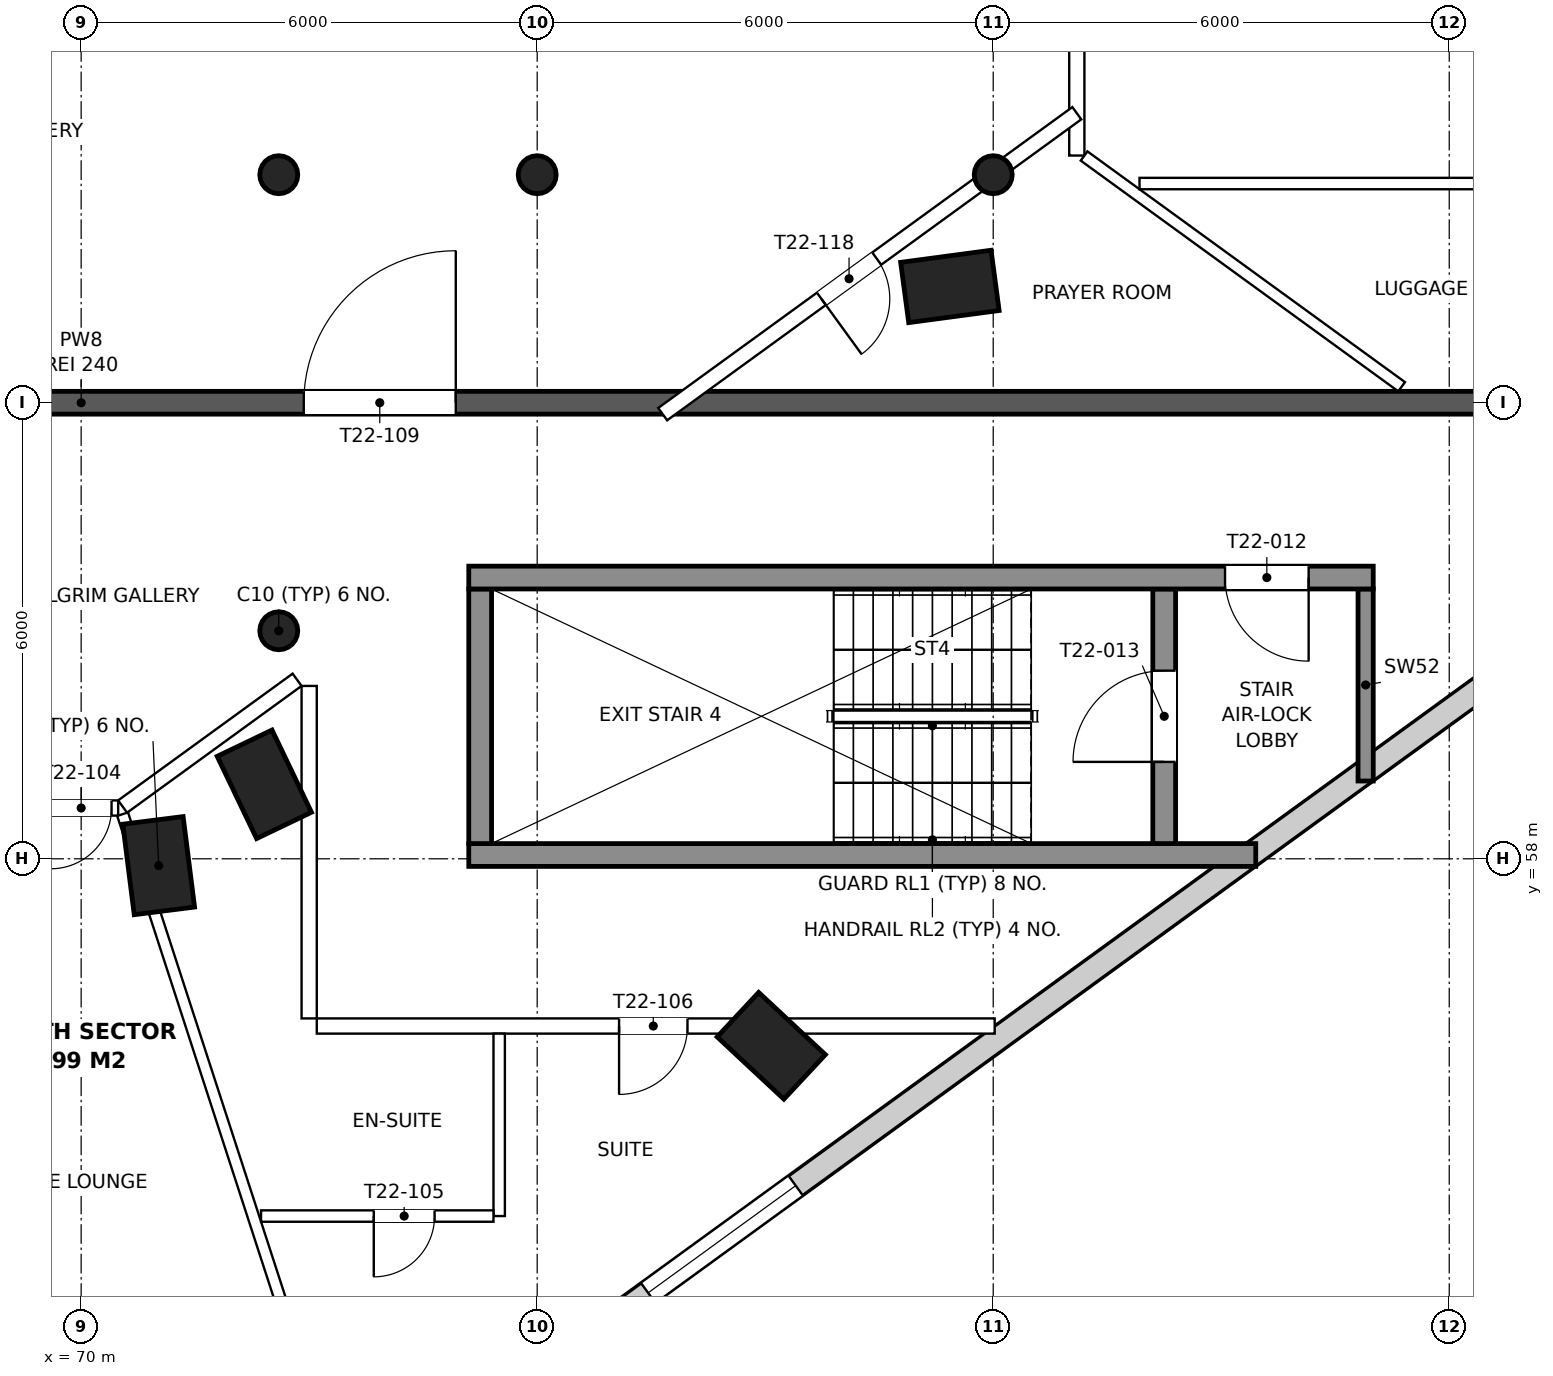
"""IFC4 building model, lengths in metres.
Left out: names, types, materials, properties, quantities, classifications, styles, units other than length and angle.
Written with IfcOpenShell. Run it as: python <this file> out.ifc"""

import sys

from ifc_helpers import new_model, si_unit, direction, frame, frame_2d, origin, origin_2d, place, context, subcontext, project, spatial, rectangle, circle, extrude, element, fill, save


model = new_model("IFC4")
c1 = context("Model", 3, precision=1e-05, world=origin(), true_north=direction((0.0, 1.0)))
c2 = subcontext(c1, "Body", "Model", "MODEL_VIEW")
j1 = project(units=[si_unit("LENGTHUNIT", "METRE"), si_unit("PLANEANGLEUNIT", "RADIAN")], contexts=[c1])
p1 = place(None, origin())
s1 = spatial("IfcSite", under=j1, at=p1, CompositionType="ELEMENT")
p2 = place(p1, origin())
s2 = spatial("IfcBuilding", under=s1, at=p2, CompositionType="ELEMENT")
p3 = place(p2, frame((0.0, 0.0, 313.9)))
s3 = spatial("IfcBuildingStorey", under=s2, at=p3, CompositionType="ELEMENT", Elevation=313.9)
for number, where, z_axis, x_axis in (
    (1, (79.08, 55.54, 0.0), (0.0, 0.0, 1.0), (-0.682, -0.731, 0.0)),
    (2, (71.02, 57.91, 0.0), (0.0, 0.0, 1.0), (-0.992, -0.126, 0.0)),
    (3, (72.41, 58.98, 0.0), (0.0, 0.0, 1.0), (-0.902, -0.432, 0.0)),
    (4, (81.43, 65.53, 0.0), (0.0, 0.0, 1.0), (0.133, -0.991, 0.0)),
):
    element("IfcColumn", number, at=place(p3, frame(where, z_axis=z_axis, x_axis=x_axis)), inside=s3, PredefinedType="COLUMN", context=c2, shape_type="SweptSolid", body=[
        extrude(rectangle(XDim=0.8, YDim=1.2, at=origin_2d()), origin(), (0.0, 0.0, 1.0), 3.9),
    ])
for number, where, z_axis, x_axis in (
    (5, (72.6, 61.0, 0.0), (0.0, 0.0, 1.0), (1.0, 0.0, 0.0)),
    (6, (72.6, 67.0, 0.0), (0.0, 0.0, 1.0), (1.0, 0.0, 0.0)),
    (7, (76.0, 67.0, 0.0), (0.0, 0.0, 1.0), (1.0, 0.0, 0.0)),
    (8, (82.0, 67.0, 0.0), (0.0, 0.0, 1.0), (1.0, 0.0, 0.0)),
):
    element("IfcColumn", number, at=place(p3, frame(where, z_axis=z_axis, x_axis=x_axis)), inside=s3, PredefinedType="COLUMN", context=c2, shape_type="SweptSolid", body=[
        extrude(circle(Radius=0.25, at=origin_2d()), origin(), (0.0, 0.0, 1.0), 3.9),
    ])
p4 = place(p3, frame((73.521, 49.428, 0.0), z_axis=(0.0, 0.0, 1.0), x_axis=(0.809014717996, 0.587788385447, 0.0)))
e9 = element("IfcWall", 9, at=p4, inside=s3, PredefinedType="SOLIDWALL", context=c2, shape_type="SweptSolid", body=[
    extrude(rectangle(XDim=21.136, YDim=0.32, at=frame_2d((10.568, 0.0))), origin(), (0.0, 0.0, 1.0), 3.6),
])
p5 = place(p4, frame((1.868, 0.0, 0.55)))
e10 = element("IfcOpeningElement", 10, at=p5, cuts=e9, PredefinedType="OPENING", context=c2, shape_type="SweptSolid", body=[
    extrude(rectangle(XDim=2.4, YDim=2.3, at=frame_2d((1.2, 1.15))), frame((0.0, 0.17, 0.0), z_axis=(0.0, -1.0, 0.0), x_axis=(1.0, 0.0, 0.0)), (0.0, 0.0, 1.0), 0.34),
])
p6 = place(p4, frame((4.868, 0.0, 0.55)))
e11 = element("IfcOpeningElement", 11, at=p6, cuts=e9, PredefinedType="OPENING", context=c2, shape_type="SweptSolid", body=[
    extrude(rectangle(XDim=2.4, YDim=2.3, at=frame_2d((1.2, 1.15))), frame((0.0, 0.17, 0.0), z_axis=(0.0, -1.0, 0.0), x_axis=(1.0, 0.0, 0.0)), (0.0, 0.0, 1.0), 0.34),
])
p7 = place(p3, frame((92.256, 66.884, 0.0), z_axis=(0.0, 0.0, 1.0), x_axis=(-0.309017883781, 0.951056227309, 0.0)))
e12 = element("IfcWall", 12, at=p7, inside=s3, PredefinedType="SOLIDWALL", context=c2, shape_type="SweptSolid", body=[
    extrude(rectangle(XDim=17.973, YDim=0.32, at=frame_2d((8.986, 0.0))), origin(), (0.0, 0.0, 1.0), 3.6),
])
p8 = place(p7, frame((1.886, 0.0, 0.75)))
e13 = element("IfcOpeningElement", 13, at=p8, cuts=e12, PredefinedType="OPENING", context=c2, shape_type="SweptSolid", body=[
    extrude(rectangle(XDim=2.2, YDim=2.1, at=frame_2d((1.1, 1.05))), frame((0.0, 0.17, 0.0), z_axis=(0.0, -1.0, 0.0), x_axis=(1.0, 0.0, 0.0)), (0.0, 0.0, 1.0), 0.34),
])
p9 = place(p7, frame((4.787, 0.0, 0.55)))
e14 = element("IfcOpeningElement", 14, at=p9, cuts=e12, PredefinedType="OPENING", context=c2, shape_type="SweptSolid", body=[
    extrude(rectangle(XDim=2.4, YDim=2.3, at=frame_2d((1.2, 1.15))), frame((0.0, 0.17, 0.0), z_axis=(0.0, -1.0, 0.0), x_axis=(1.0, 0.0, 0.0)), (0.0, 0.0, 1.0), 0.34),
])
p10 = place(p7, frame((7.787, 0.0, 0.55)))
e15 = element("IfcOpeningElement", 15, at=p10, cuts=e12, PredefinedType="OPENING", context=c2, shape_type="SweptSolid", body=[
    extrude(rectangle(XDim=2.4, YDim=2.3, at=frame_2d((1.2, 1.15))), frame((0.0, 0.17, 0.0), z_axis=(0.0, -1.0, 0.0), x_axis=(1.0, 0.0, 0.0)), (0.0, 0.0, 1.0), 0.34),
])
p11 = place(p7, frame((10.787, 0.0, 0.55)))
e16 = element("IfcOpeningElement", 16, at=p11, cuts=e12, PredefinedType="OPENING", context=c2, shape_type="SweptSolid", body=[
    extrude(rectangle(XDim=2.4, YDim=2.3, at=frame_2d((1.2, 1.15))), frame((0.0, 0.17, 0.0), z_axis=(0.0, -1.0, 0.0), x_axis=(1.0, 0.0, 0.0)), (0.0, 0.0, 1.0), 0.34),
])
p12 = place(p7, frame((13.787, 0.0, 0.55)))
e17 = element("IfcOpeningElement", 17, at=p12, cuts=e12, PredefinedType="OPENING", context=c2, shape_type="SweptSolid", body=[
    extrude(rectangle(XDim=2.4, YDim=2.3, at=frame_2d((1.2, 1.15))), frame((0.0, 0.17, 0.0), z_axis=(0.0, -1.0, 0.0), x_axis=(1.0, 0.0, 0.0)), (0.0, 0.0, 1.0), 0.34),
])
p13 = place(p3, frame((75.1, 58.05, 0.0), z_axis=(0.0, 0.0, 1.0), x_axis=(1.0, 0.0, 0.0)))
e18 = element("IfcWall", 18, at=p13, inside=s3, PredefinedType="SHEAR", context=c2, shape_type="SweptSolid", body=[
    extrude(rectangle(XDim=10.354, YDim=0.3, at=frame_2d((5.177, 0.0))), origin(), (0.0, 0.0, 1.0), 3.9),
])
p14 = place(p3, frame((75.25, 58.2, 0.0), z_axis=(0.0, 0.0, 1.0), x_axis=(0.0, 1.0, 0.0)))
e19 = element("IfcWall", 19, at=p14, inside=s3, PredefinedType="SHEAR", context=c2, shape_type="SweptSolid", body=[
    extrude(rectangle(XDim=3.35, YDim=0.3, at=frame_2d((1.675, 0.0))), origin(), (0.0, 0.0, 1.0), 3.9),
])
p15 = place(p3, frame((84.25, 58.2, 0.0), z_axis=(0.0, 0.0, 1.0), x_axis=(0.0, 1.0, 0.0)))
e20 = element("IfcWall", 20, at=p15, inside=s3, PredefinedType="SHEAR", context=c2, shape_type="SweptSolid", body=[
    extrude(rectangle(XDim=3.35, YDim=0.3, at=frame_2d((1.675, 0.0))), origin(), (0.0, 0.0, 1.0), 3.9),
])
p16 = place(p15, frame((1.075, 0.0, 0.0)))
e21 = element("IfcOpeningElement", 21, at=p16, cuts=e20, PredefinedType="OPENING", context=c2, shape_type="SweptSolid", body=[
    extrude(rectangle(XDim=1.2, YDim=2.1, at=frame_2d((0.6, 1.05))), frame((0.0, 0.16, 0.0), z_axis=(0.0, -1.0, 0.0), x_axis=(1.0, 0.0, 0.0)), (0.0, 0.0, 1.0), 0.32),
])
p17 = place(p3, frame((86.9, 59.023, 0.0), z_axis=(0.0, 0.0, 1.0), x_axis=(0.0, 1.0, 0.0)))
e22 = element("IfcWall", 22, at=p17, inside=s3, PredefinedType="SHEAR", context=c2, shape_type="SweptSolid", body=[
    extrude(rectangle(XDim=2.527, YDim=0.2, at=frame_2d((1.263, 0.0))), origin(), (0.0, 0.0, 1.0), 3.9),
])
p18 = place(p3, frame((75.1, 61.7, 0.0), z_axis=(0.0, 0.0, 1.0), x_axis=(1.0, 0.0, 0.0)))
e23 = element("IfcWall", 23, at=p18, inside=s3, PredefinedType="SHEAR", context=c2, shape_type="SweptSolid", body=[
    extrude(rectangle(XDim=11.9, YDim=0.3, at=frame_2d((5.95, 0.0))), origin(), (0.0, 0.0, 1.0), 3.9),
])
p19 = place(p18, frame((9.95, 0.0, 0.0)))
e24 = element("IfcOpeningElement", 24, at=p19, cuts=e23, PredefinedType="OPENING", context=c2, shape_type="SweptSolid", body=[
    extrude(rectangle(XDim=1.1, YDim=2.1, at=frame_2d((0.55, 1.05))), frame((0.0, 0.16, 0.0), z_axis=(0.0, -1.0, 0.0), x_axis=(1.0, 0.0, 0.0)), (0.0, 0.0, 1.0), 0.32),
])
p20 = place(p3, frame((48.85, 64.0, 0.0), z_axis=(0.0, 0.0, 1.0), x_axis=(1.0, 0.0, 0.0)))
e25 = element("IfcWall", 25, at=p20, inside=s3, PredefinedType="PARTITIONING", context=c2, shape_type="SweptSolid", body=[
    extrude(rectangle(XDim=42.301, YDim=0.3, at=frame_2d((21.15, 0.0))), origin(), (0.0, 0.0, 1.0), 3.1),
])
p21 = place(p20, frame((16.222, 0.0, 0.0)))
e26 = element("IfcOpeningElement", 26, at=p21, cuts=e25, PredefinedType="OPENING", context=c2, shape_type="SweptSolid", body=[
    extrude(rectangle(XDim=2.0, YDim=2.1, at=frame_2d((1.0, 1.05))), frame((0.0, 0.16, 0.0), z_axis=(0.0, -1.0, 0.0), x_axis=(1.0, 0.0, 0.0)), (0.0, 0.0, 1.0), 0.32),
])
p22 = place(p20, frame((24.079, 0.0, 0.0)))
e27 = element("IfcOpeningElement", 27, at=p22, cuts=e25, PredefinedType="OPENING", context=c2, shape_type="SweptSolid", body=[
    extrude(rectangle(XDim=2.0, YDim=2.1, at=frame_2d((1.0, 1.05))), frame((0.0, 0.16, 0.0), z_axis=(0.0, -1.0, 0.0), x_axis=(1.0, 0.0, 0.0)), (0.0, 0.0, 1.0), 0.32),
])
p23 = place(p3, frame((83.1, 86.396, 0.0), z_axis=(0.0, 0.0, 1.0), x_axis=(0.0, -1.0, 0.0)))
e28 = element("IfcWall", 28, at=p23, inside=s3, PredefinedType="PARTITIONING", context=c2, shape_type="SweptSolid", body=[
    extrude(rectangle(XDim=19.144, YDim=0.2, at=frame_2d((9.572, 0.0))), origin(), (0.0, 0.0, 1.0), 3.15),
])
p24 = place(p23, frame((2.422, 0.0, 0.0)))
e29 = element("IfcOpeningElement", 29, at=p24, cuts=e28, PredefinedType="OPENING", context=c2, shape_type="SweptSolid", body=[
    extrude(rectangle(XDim=0.9, YDim=2.1, at=frame_2d((0.45, 1.05))), frame((0.0, 0.11, 0.0), z_axis=(0.0, -1.0, 0.0), x_axis=(1.0, 0.0, 0.0)), (0.0, 0.0, 1.0), 0.22),
])
p25 = place(p23, frame((5.873, 0.0, 0.0)))
e30 = element("IfcOpeningElement", 30, at=p25, cuts=e28, PredefinedType="OPENING", context=c2, shape_type="SweptSolid", body=[
    extrude(rectangle(XDim=0.9, YDim=2.1, at=frame_2d((0.45, 1.05))), frame((0.0, 0.11, 0.0), z_axis=(0.0, -1.0, 0.0), x_axis=(1.0, 0.0, 0.0)), (0.0, 0.0, 1.0), 0.22),
])
p26 = place(p23, frame((12.539, 0.0, 0.0)))
e31 = element("IfcOpeningElement", 31, at=p26, cuts=e28, PredefinedType="OPENING", context=c2, shape_type="SweptSolid", body=[
    extrude(rectangle(XDim=0.9, YDim=2.1, at=frame_2d((0.45, 1.05))), frame((0.0, 0.11, 0.0), z_axis=(0.0, -1.0, 0.0), x_axis=(1.0, 0.0, 0.0)), (0.0, 0.0, 1.0), 0.22),
])
p27 = place(p23, frame((15.628, 0.0, 0.0)))
e32 = element("IfcOpeningElement", 32, at=p27, cuts=e28, PredefinedType="OPENING", context=c2, shape_type="SweptSolid", body=[
    extrude(rectangle(XDim=0.9, YDim=2.1, at=frame_2d((0.45, 1.05))), frame((0.0, 0.11, 0.0), z_axis=(0.0, -1.0, 0.0), x_axis=(1.0, 0.0, 0.0)), (0.0, 0.0, 1.0), 0.22),
])
p28 = place(p3, frame((83.1, 67.809, 0.0), z_axis=(0.0, 0.0, 1.0), x_axis=(-0.809033820778, -0.587762092038, 0.0)))
e33 = element("IfcWall", 33, at=p28, inside=s3, PredefinedType="PARTITIONING", context=c2, shape_type="SweptSolid", body=[
    extrude(rectangle(XDim=6.735, YDim=0.2, at=frame_2d((3.367, 0.0))), origin(), (0.0, 0.0, 1.0), 3.6),
])
p29 = place(p28, frame((3.254, 0.0, 0.0)))
e34 = element("IfcOpeningElement", 34, at=p29, cuts=e33, PredefinedType="OPENING", context=c2, shape_type="SweptSolid", body=[
    extrude(rectangle(XDim=0.9, YDim=2.1, at=frame_2d((0.45, 1.05))), frame((0.0, 0.11, 0.0), z_axis=(0.0, -1.0, 0.0), x_axis=(1.0, 0.0, 0.0)), (0.0, 0.0, 1.0), 0.22),
])
p30 = place(p3, frame((82.019, 55.8, 0.0), z_axis=(0.0, 0.0, 1.0), x_axis=(-1.0, 0.0, 0.0)))
e35 = element("IfcWall", 35, at=p30, inside=s3, PredefinedType="PARTITIONING", context=c2, shape_type="SweptSolid", body=[
    extrude(rectangle(XDim=8.919, YDim=0.2, at=frame_2d((4.459, 0.0))), origin(), (0.0, 0.0, 1.0), 3.6),
])
p31 = place(p30, frame((4.042, 0.0, 0.0)))
e36 = element("IfcOpeningElement", 36, at=p31, cuts=e35, PredefinedType="OPENING", context=c2, shape_type="SweptSolid", body=[
    extrude(rectangle(XDim=0.9, YDim=2.1, at=frame_2d((0.45, 1.05))), frame((0.0, 0.11, 0.0), z_axis=(0.0, -1.0, 0.0), x_axis=(1.0, 0.0, 0.0)), (0.0, 0.0, 1.0), 0.22),
])
p32 = place(p3, frame((73.0, 55.9, 0.0), z_axis=(0.0, 0.0, 1.0), x_axis=(0.0, 1.0, 0.0)))
e37 = element("IfcWall", 37, at=p32, inside=s3, PredefinedType="PARTITIONING", context=c2, shape_type="SweptSolid", body=[
    extrude(rectangle(XDim=4.375, YDim=0.2, at=frame_2d((2.187, 0.0))), origin(), (0.0, 0.0, 1.0), 3.1),
])
p33 = place(p3, frame((72.841, 60.355, 0.0), z_axis=(0.0, 0.0, 1.0), x_axis=(-0.80904479074, -0.587746991976, 0.0)))
e38 = element("IfcWall", 38, at=p33, inside=s3, PredefinedType="PARTITIONING", context=c2, shape_type="SweptSolid", body=[
    extrude(rectangle(XDim=2.837, YDim=0.2, at=frame_2d((1.419, 0.0))), origin(), (0.0, 0.0, 1.0), 3.6),
])
p34 = place(p3, frame((70.487, 58.668, 0.0), z_axis=(0.0, 0.0, 1.0), x_axis=(-1.0, 0.0, 0.0)))
e39 = element("IfcWall", 39, at=p34, inside=s3, PredefinedType="PARTITIONING", context=c2, shape_type="SweptSolid", body=[
    extrude(rectangle(XDim=0.974, YDim=0.2, at=frame_2d((0.487, 0.0))), origin(), (0.0, 0.0, 1.0), 3.6),
])
p35 = place(p34, frame((0.087, 0.0, 0.0)))
e40 = element("IfcOpeningElement", 40, at=p35, cuts=e39, PredefinedType="OPENING", context=c2, shape_type="SweptSolid", body=[
    extrude(rectangle(XDim=0.8, YDim=2.1, at=frame_2d((0.4, 1.05))), frame((0.0, 0.11, 0.0), z_axis=(0.0, -1.0, 0.0), x_axis=(1.0, 0.0, 0.0)), (0.0, 0.0, 1.0), 0.22),
])
p36 = place(p3, frame((73.469, 49.588, 0.0), z_axis=(0.0, 0.0, 1.0), x_axis=(-0.3090043917, 0.95106061106, 0.0)))
e41 = element("IfcWall", 41, at=p36, inside=s3, PredefinedType="PARTITIONING", context=c2, shape_type="SweptSolid", body=[
    extrude(rectangle(XDim=9.462, YDim=0.15, at=frame_2d((4.731, 0.0))), origin(), (0.0, 0.0, 1.0), 3.15),
])
p37 = place(p3, frame((87.374, 64.211, 0.0), z_axis=(0.0, 0.0, 1.0), x_axis=(-0.809024239464, 0.587775280153, 0.0)))
e42 = element("IfcWall", 42, at=p37, inside=s3, PredefinedType="PARTITIONING", context=c2, shape_type="SweptSolid", body=[
    extrude(rectangle(XDim=5.164, YDim=0.15, at=frame_2d((2.582, 0.0))), origin(), (0.0, 0.0, 1.0), 3.6),
])
p38 = place(p3, frame((92.087, 66.884, 0.0), z_axis=(0.0, 0.0, 1.0), x_axis=(-1.0, 0.0, 0.0)))
e43 = element("IfcWall", 43, at=p38, inside=s3, PredefinedType="PARTITIONING", context=c2, shape_type="SweptSolid", body=[
    extrude(rectangle(XDim=8.162, YDim=0.15, at=frame_2d((4.081, 0.0))), origin(), (0.0, 0.0, 1.0), 3.15),
])
p39 = place(p38, frame((0.2, 0.0, 0.0)))
e44 = element("IfcOpeningElement", 44, at=p39, cuts=e43, PredefinedType="OPENING", context=c2, shape_type="SweptSolid", body=[
    extrude(rectangle(XDim=0.9, YDim=2.1, at=frame_2d((0.45, 1.05))), frame((0.0, 0.085, 0.0), z_axis=(0.0, -1.0, 0.0), x_axis=(1.0, 0.0, 0.0)), (0.0, 0.0, 1.0), 0.17),
])
p40 = place(p3, frame((75.5, 55.7, 0.0), z_axis=(0.0, 0.0, 1.0), x_axis=(0.0, -1.0, 0.0)))
e45 = element("IfcWall", 45, at=p40, inside=s3, PredefinedType="PARTITIONING", context=c2, shape_type="SweptSolid", body=[
    extrude(rectangle(XDim=2.4, YDim=0.15, at=frame_2d((1.2, 0.0))), origin(), (0.0, 0.0, 1.0), 3.6),
])
p41 = place(p3, frame((72.367, 53.3, 0.0), z_axis=(0.0, 0.0, 1.0), x_axis=(1.0, 0.0, 0.0)))
e46 = element("IfcWall", 46, at=p41, inside=s3, PredefinedType="PARTITIONING", context=c2, shape_type="SweptSolid", body=[
    extrude(rectangle(XDim=3.058, YDim=0.15, at=frame_2d((1.529, 0.0))), origin(), (0.0, 0.0, 1.0), 3.6),
])
p42 = place(p41, frame((1.483, 0.0, 0.0)))
e47 = element("IfcOpeningElement", 47, at=p42, cuts=e46, PredefinedType="OPENING", context=c2, shape_type="SweptSolid", body=[
    extrude(rectangle(XDim=0.8, YDim=2.1, at=frame_2d((0.4, 1.05))), frame((0.0, 0.085, 0.0), z_axis=(0.0, -1.0, 0.0), x_axis=(1.0, 0.0, 0.0)), (0.0, 0.0, 1.0), 0.17),
])
p43 = place(p6, origin())
e48 = element("IfcWindow", 48, at=p43, inside=s3, PartitioningType="SINGLE_PANEL", PredefinedType="WINDOW", context=c2, shape_type="SweptSolid", body=[
    extrude(rectangle(XDim=2.4, YDim=2.3, at=frame_2d((1.2, 1.15))), frame((0.0, 0.07, 0.0), z_axis=(0.0, -1.0, 0.0), x_axis=(1.0, 0.0, 0.0)), (0.0, 0.0, 1.0), 0.06),
])
fill(e11, e48)
p44 = place(p19, frame((1.1, 0.0, 0.0), z_axis=(0.0, 0.0, 1.0), x_axis=(-1.0, 0.0, 0.0)))
e49 = element("IfcDoor", 49, at=p44, inside=s3, OperationType="SINGLE_SWING_LEFT", PredefinedType="DOOR", context=c2, shape_type="SweptSolid", body=[
    extrude(rectangle(XDim=1.1, YDim=2.1, at=frame_2d((0.55, 1.05))), frame((0.0, 0.025, 0.0), z_axis=(0.0, -1.0, 0.0), x_axis=(1.0, 0.0, 0.0)), (0.0, 0.0, 1.0), 0.05),
])
fill(e24, e49)
p45 = place(p16, origin())
e50 = element("IfcDoor", 50, at=p45, inside=s3, OperationType="SINGLE_SWING_LEFT", PredefinedType="DOOR", context=c2, shape_type="SweptSolid", body=[
    extrude(rectangle(XDim=1.2, YDim=2.1, at=frame_2d((0.6, 1.05))), frame((0.0, 0.025, 0.0), z_axis=(0.0, -1.0, 0.0), x_axis=(1.0, 0.0, 0.0)), (0.0, 0.0, 1.0), 0.05),
])
fill(e21, e50)
p46 = place(p35, origin())
e51 = element("IfcDoor", 51, at=p46, inside=s3, OperationType="SINGLE_SWING_RIGHT", PredefinedType="DOOR", context=c2, shape_type="SweptSolid", body=[
    extrude(rectangle(XDim=0.8, YDim=2.1, at=frame_2d((0.4, 1.05))), frame((0.0, 0.025, 0.0), z_axis=(0.0, -1.0, 0.0), x_axis=(1.0, 0.0, 0.0)), (0.0, 0.0, 1.0), 0.05),
])
fill(e40, e51)
p47 = place(p42, frame((0.8, 0.0, 0.0), z_axis=(0.0, 0.0, 1.0), x_axis=(-1.0, 0.0, 0.0)))
e52 = element("IfcDoor", 52, at=p47, inside=s3, OperationType="SINGLE_SWING_RIGHT", PredefinedType="DOOR", context=c2, shape_type="SweptSolid", body=[
    extrude(rectangle(XDim=0.8, YDim=2.1, at=frame_2d((0.4, 1.05))), frame((0.0, 0.025, 0.0), z_axis=(0.0, -1.0, 0.0), x_axis=(1.0, 0.0, 0.0)), (0.0, 0.0, 1.0), 0.05),
])
fill(e47, e52)
p48 = place(p31, origin())
e53 = element("IfcDoor", 53, at=p48, inside=s3, OperationType="SINGLE_SWING_RIGHT", PredefinedType="DOOR", context=c2, shape_type="SweptSolid", body=[
    extrude(rectangle(XDim=0.9, YDim=2.1, at=frame_2d((0.45, 1.05))), frame((0.0, 0.025, 0.0), z_axis=(0.0, -1.0, 0.0), x_axis=(1.0, 0.0, 0.0)), (0.0, 0.0, 1.0), 0.05),
])
fill(e36, e53)
p49 = place(p22, origin())
e54 = element("IfcDoor", 54, at=p49, inside=s3, OperationType="DOUBLE_DOOR_SINGLE_SWING", PredefinedType="DOOR", context=c2, shape_type="SweptSolid", body=[
    extrude(rectangle(XDim=2.0, YDim=2.1, at=frame_2d((1.0, 1.05))), frame((0.0, 0.025, 0.0), z_axis=(0.0, -1.0, 0.0), x_axis=(1.0, 0.0, 0.0)), (0.0, 0.0, 1.0), 0.05),
])
fill(e27, e54)
p50 = place(p29, origin())
e55 = element("IfcDoor", 55, at=p50, inside=s3, OperationType="SINGLE_SWING_RIGHT", PredefinedType="DOOR", context=c2, shape_type="SweptSolid", body=[
    extrude(rectangle(XDim=0.9, YDim=2.1, at=frame_2d((0.45, 1.05))), frame((0.0, 0.025, 0.0), z_axis=(0.0, -1.0, 0.0), x_axis=(1.0, 0.0, 0.0)), (0.0, 0.0, 1.0), 0.05),
])
fill(e34, e55)
save(model, sys.argv[1])
